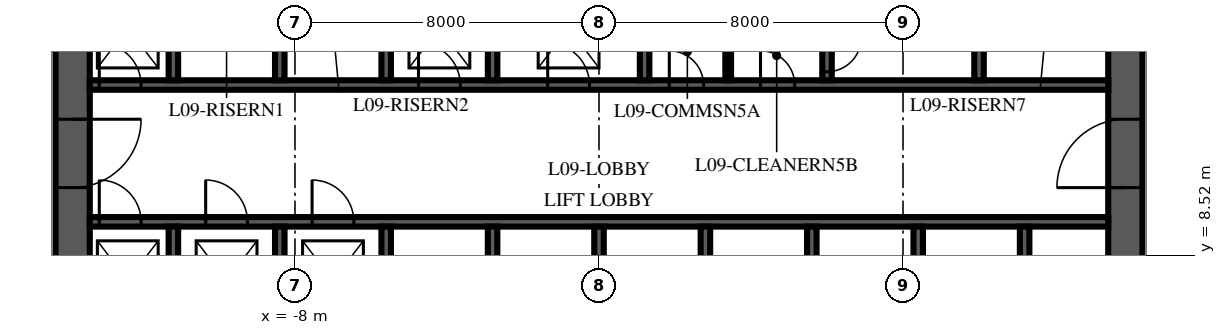
"""IFC4 building model, lengths in metres.
Left out: names, types, materials, properties, quantities, classifications, styles, units other than length and angle.
Written with IfcOpenShell. Run it as: python <this file> out.ifc"""

import sys

from ifc_helpers import new_model, si_unit, direction, frame, frame_2d, origin, place, context, subcontext, project, spatial, polyline, rectangle, outline, extrude, element, fill, save


model = new_model("IFC4")
c1 = context("Model", 3, precision=1e-05, world=origin(), true_north=direction((0.0, 1.0)))
c2 = subcontext(c1, "Body", "Model", "MODEL_VIEW")
j1 = project(units=[si_unit("LENGTHUNIT", "METRE"), si_unit("PLANEANGLEUNIT", "RADIAN")], contexts=[c1])
p1 = place(None, origin())
s1 = spatial("IfcSite", under=j1, at=p1, CompositionType="ELEMENT")
p2 = place(p1, origin())
s2 = spatial("IfcBuilding", under=s1, at=p2, CompositionType="ELEMENT")
p3 = place(p2, frame((0.0, 0.0, 48.0)))
s3 = spatial("IfcBuildingStorey", under=s2, at=p3, CompositionType="ELEMENT", Elevation=48.0)
p4 = place(p3, frame((13.85, 6.15, 0.0), z_axis=(0.0, 0.0, 1.0), x_axis=(0.0, 1.0, 0.0)))
e1 = element("IfcWall", 1, at=p4, inside=s3, PredefinedType="SHEAR", context=c2, shape_type="SweptSolid", body=[
    extrude(outline(polyline([(0.0, -0.45), (17.7, -0.45), (17.7, 0.0), (17.25, 0.0), (17.25, 0.45), (0.45, 0.45), (0.45, 0.0), (0.0, 0.0), (0.0, -0.45)])), origin(), (0.0, 0.0, 1.0), 4.0),
])
p5 = place(p4, frame((4.15, 0.0, 0.0)))
e2 = element("IfcOpeningElement", 2, at=p5, cuts=e1, PredefinedType="OPENING", context=c2, shape_type="SweptSolid", body=[
    extrude(rectangle(XDim=1.8, YDim=2.4, at=frame_2d((0.9, 1.2))), frame((0.0, 0.465, 0.0), z_axis=(0.0, -1.0, 0.0), x_axis=(1.0, 0.0, 0.0)), (0.0, 0.0, 1.0), 0.93),
])
p6 = place(p3, frame((-13.85, 23.85, 0.0), z_axis=(0.0, 0.0, 1.0), x_axis=(0.0, -1.0, 0.0)))
e3 = element("IfcWall", 3, at=p6, inside=s3, PredefinedType="SHEAR", context=c2, shape_type="SweptSolid", body=[
    extrude(outline(polyline([(0.0, -0.45), (17.7, -0.45), (17.7, 0.0), (17.25, 0.0), (17.25, 0.45), (0.45, 0.45), (0.45, 0.0), (0.0, 0.0), (0.0, -0.45)])), origin(), (0.0, 0.0, 1.0), 4.0),
])
p7 = place(p6, frame((11.75, 0.0, 0.0)))
e4 = element("IfcOpeningElement", 4, at=p7, cuts=e3, PredefinedType="OPENING", context=c2, shape_type="SweptSolid", body=[
    extrude(rectangle(XDim=1.8, YDim=2.4, at=frame_2d((0.9, 1.2))), frame((0.0, 0.465, 0.0), z_axis=(0.0, -1.0, 0.0), x_axis=(1.0, 0.0, 0.0)), (0.0, 0.0, 1.0), 0.93),
])
p8 = place(p3, frame((-13.4, 9.4, 0.0), z_axis=(0.0, 0.0, 1.0), x_axis=(1.0, 0.0, 0.0)))
e5 = element("IfcWall", 5, at=p8, inside=s3, PredefinedType="SHEAR", context=c2, shape_type="SweptSolid", body=[
    extrude(rectangle(XDim=26.8, YDim=0.25, at=frame_2d((13.4, 0.0))), origin(), (0.0, 0.0, 1.0), 4.0),
])
p9 = place(p8, frame((0.25, 0.0, 0.0)))
e6 = element("IfcOpeningElement", 6, at=p9, cuts=e5, PredefinedType="OPENING", context=c2, shape_type="SweptSolid", body=[
    extrude(rectangle(XDim=1.1, YDim=2.1, at=frame_2d((0.55, 1.05))), frame((0.0, 0.14, 0.0), z_axis=(0.0, -1.0, 0.0), x_axis=(1.0, 0.0, 0.0)), (0.0, 0.0, 1.0), 0.28),
])
p10 = place(p8, frame((3.05, 0.0, 0.0)))
e7 = element("IfcOpeningElement", 7, at=p10, cuts=e5, PredefinedType="OPENING", context=c2, shape_type="SweptSolid", body=[
    extrude(rectangle(XDim=1.1, YDim=2.1, at=frame_2d((0.55, 1.05))), frame((0.0, 0.14, 0.0), z_axis=(0.0, -1.0, 0.0), x_axis=(1.0, 0.0, 0.0)), (0.0, 0.0, 1.0), 0.28),
])
p11 = place(p8, frame((5.85, 0.0, 0.0)))
e8 = element("IfcOpeningElement", 8, at=p11, cuts=e5, PredefinedType="OPENING", context=c2, shape_type="SweptSolid", body=[
    extrude(rectangle(XDim=1.1, YDim=2.1, at=frame_2d((0.55, 1.05))), frame((0.0, 0.14, 0.0), z_axis=(0.0, -1.0, 0.0), x_axis=(1.0, 0.0, 0.0)), (0.0, 0.0, 1.0), 0.28),
])
p12 = place(p3, frame((-13.4, 13.0, 0.0), z_axis=(0.0, 0.0, 1.0), x_axis=(1.0, 0.0, 0.0)))
e9 = element("IfcWall", 9, at=p12, inside=s3, PredefinedType="SHEAR", context=c2, shape_type="SweptSolid", body=[
    extrude(rectangle(XDim=26.8, YDim=0.25, at=frame_2d((13.4, 0.0))), origin(), (0.0, 0.0, 1.0), 4.0),
])
p13 = place(p12, frame((0.25, 0.0, 0.0)))
e10 = element("IfcOpeningElement", 10, at=p13, cuts=e9, PredefinedType="OPENING", context=c2, shape_type="SweptSolid", body=[
    extrude(rectangle(XDim=1.1, YDim=2.1, at=frame_2d((0.55, 1.05))), frame((0.0, 0.14, 0.0), z_axis=(0.0, -1.0, 0.0), x_axis=(1.0, 0.0, 0.0)), (0.0, 0.0, 1.0), 0.28),
])
p14 = place(p12, frame((8.65, 0.0, 0.0)))
e11 = element("IfcOpeningElement", 11, at=p14, cuts=e9, PredefinedType="OPENING", context=c2, shape_type="SweptSolid", body=[
    extrude(rectangle(XDim=1.1, YDim=2.1, at=frame_2d((0.55, 1.05))), frame((0.0, 0.14, 0.0), z_axis=(0.0, -1.0, 0.0), x_axis=(1.0, 0.0, 0.0)), (0.0, 0.0, 1.0), 0.28),
])
p15 = place(p12, frame((12.05, 0.0, 0.0)))
e12 = element("IfcOpeningElement", 12, at=p15, cuts=e9, PredefinedType="OPENING", context=c2, shape_type="SweptSolid", body=[
    extrude(rectangle(XDim=1.1, YDim=2.1, at=frame_2d((0.55, 1.05))), frame((0.0, 0.14, 0.0), z_axis=(0.0, -1.0, 0.0), x_axis=(1.0, 0.0, 0.0)), (0.0, 0.0, 1.0), 0.28),
])
p16 = place(p12, frame((15.25, 0.0, 0.0)))
e13 = element("IfcOpeningElement", 13, at=p16, cuts=e9, PredefinedType="OPENING", context=c2, shape_type="SweptSolid", body=[
    extrude(rectangle(XDim=0.9, YDim=2.1, at=frame_2d((0.45, 1.05))), frame((0.0, 0.14, 0.0), z_axis=(0.0, -1.0, 0.0), x_axis=(1.0, 0.0, 0.0)), (0.0, 0.0, 1.0), 0.28),
])
p17 = place(p12, frame((17.65, 0.0, 0.0)))
e14 = element("IfcOpeningElement", 14, at=p17, cuts=e9, PredefinedType="OPENING", context=c2, shape_type="SweptSolid", body=[
    extrude(rectangle(XDim=0.9, YDim=2.1, at=frame_2d((0.45, 1.05))), frame((0.0, 0.14, 0.0), z_axis=(0.0, -1.0, 0.0), x_axis=(1.0, 0.0, 0.0)), (0.0, 0.0, 1.0), 0.28),
])
for number, where, z_axis, x_axis in (
    (15, (-11.2, 6.6, 0.0), (0.0, 0.0, 1.0), (0.0, 1.0, 0.0)),
    (16, (-8.4, 6.6, 0.0), (0.0, 0.0, 1.0), (0.0, 1.0, 0.0)),
    (17, (-5.6, 6.6, 0.0), (0.0, 0.0, 1.0), (0.0, 1.0, 0.0)),
    (18, (-2.8, 6.6, 0.0), (0.0, 0.0, 1.0), (0.0, 1.0, 0.0)),
    (19, (0.0, 6.6, 0.0), (0.0, 0.0, 1.0), (0.0, 1.0, 0.0)),
    (20, (2.8, 6.6, 0.0), (0.0, 0.0, 1.0), (0.0, 1.0, 0.0)),
    (21, (5.6, 6.6, 0.0), (0.0, 0.0, 1.0), (0.0, 1.0, 0.0)),
    (22, (8.4, 6.6, 0.0), (0.0, 0.0, 1.0), (0.0, 1.0, 0.0)),
    (23, (11.2, 6.6, 0.0), (0.0, 0.0, 1.0), (0.0, 1.0, 0.0)),
):
    element("IfcWall", number, at=place(p3, frame(where, z_axis=z_axis, x_axis=x_axis)), inside=s3, PredefinedType="SHEAR", context=c2, shape_type="SweptSolid", body=[
        extrude(rectangle(XDim=2.675, YDim=0.25, at=frame_2d((1.337, 0.0))), origin(), (0.0, 0.0, 1.0), 4.0),
    ])
for number, where, z_axis, x_axis in (
    (24, (-11.2, 13.125, 0.0), (0.0, 0.0, 1.0), (0.0, 1.0, 0.0)),
    (25, (-8.4, 13.125, 0.0), (0.0, 0.0, 1.0), (0.0, 1.0, 0.0)),
    (26, (-5.6, 13.125, 0.0), (0.0, 0.0, 1.0), (0.0, 1.0, 0.0)),
    (27, (-2.8, 13.125, 0.0), (0.0, 0.0, 1.0), (0.0, 1.0, 0.0)),
    (28, (1.2, 13.125, 0.0), (0.0, 0.0, 1.0), (0.0, 1.0, 0.0)),
):
    element("IfcWall", number, at=place(p3, frame(where, z_axis=z_axis, x_axis=x_axis)), inside=s3, PredefinedType="SHEAR", context=c2, shape_type="SweptSolid", body=[
        extrude(rectangle(XDim=2.75, YDim=0.25, at=frame_2d((1.375, 0.0))), origin(), (0.0, 0.0, 1.0), 4.0),
    ])
p18 = place(p3, frame((6.0, 13.125, 0.0), z_axis=(0.0, 0.0, 1.0), x_axis=(0.0, 1.0, 0.0)))
e29 = element("IfcWall", 29, at=p18, inside=s3, PredefinedType="SHEAR", context=c2, shape_type="SweptSolid", body=[
    extrude(rectangle(XDim=2.75, YDim=0.25, at=frame_2d((1.375, 0.0))), origin(), (0.0, 0.0, 1.0), 4.0),
])
p19 = place(p18, frame((0.225, 0.0, 0.0)))
e30 = element("IfcOpeningElement", 30, at=p19, cuts=e29, PredefinedType="OPENING", context=c2, shape_type="SweptSolid", body=[
    extrude(rectangle(XDim=0.9, YDim=2.1, at=frame_2d((0.45, 1.05))), frame((0.0, 0.14, 0.0), z_axis=(0.0, -1.0, 0.0), x_axis=(1.0, 0.0, 0.0)), (0.0, 0.0, 1.0), 0.28),
])
p20 = place(p3, frame((10.0, 13.125, 0.0), z_axis=(0.0, 0.0, 1.0), x_axis=(0.0, 1.0, 0.0)))
e31 = element("IfcWall", 31, at=p20, inside=s3, PredefinedType="SHEAR", context=c2, shape_type="SweptSolid", body=[
    extrude(rectangle(XDim=2.75, YDim=0.25, at=frame_2d((1.375, 0.0))), origin(), (0.0, 0.0, 1.0), 4.0),
])
p21 = place(p3, frame((3.4, 13.125, 0.0), z_axis=(0.0, 0.0, 1.0), x_axis=(0.0, 1.0, 0.0)))
e32 = element("IfcWall", 32, at=p21, inside=s3, PredefinedType="PARTITIONING", context=c2, shape_type="SweptSolid", body=[
    extrude(rectangle(XDim=1.45, YDim=0.15, at=frame_2d((0.725, 0.0))), origin(), (0.0, 0.0, 1.0), 3.85),
])
p22 = place(p5, origin())
e33 = element("IfcDoor", 33, at=p22, inside=s3, OperationType="DOUBLE_DOOR_SINGLE_SWING", PredefinedType="DOOR", context=c2, shape_type="SweptSolid", body=[
    extrude(rectangle(XDim=1.8, YDim=2.4, at=frame_2d((0.9, 1.2))), frame((0.0, 0.45, 0.0), z_axis=(0.0, -1.0, 0.0), x_axis=(1.0, 0.0, 0.0)), (0.0, 0.0, 1.0), 0.899),
])
fill(e2, e33)
p23 = place(p7, origin())
e34 = element("IfcDoor", 34, at=p23, inside=s3, OperationType="DOUBLE_DOOR_SINGLE_SWING", PredefinedType="DOOR", context=c2, shape_type="SweptSolid", body=[
    extrude(rectangle(XDim=1.8, YDim=2.4, at=frame_2d((0.9, 1.2))), frame((0.0, 0.45, 0.0), z_axis=(0.0, -1.0, 0.0), x_axis=(1.0, 0.0, 0.0)), (0.0, 0.0, 1.0), 0.899),
])
fill(e4, e34)
p24 = place(p9, origin())
e35 = element("IfcDoor", 35, at=p24, inside=s3, OperationType="SLIDING_TO_LEFT", PredefinedType="DOOR", context=c2, shape_type="SweptSolid", body=[
    extrude(rectangle(XDim=1.1, YDim=2.1, at=frame_2d((0.55, 1.05))), frame((0.0, 0.125, 0.0), z_axis=(0.0, -1.0, 0.0), x_axis=(1.0, 0.0, 0.0)), (0.0, 0.0, 1.0), 0.25),
])
fill(e6, e35)
p25 = place(p10, origin())
e36 = element("IfcDoor", 36, at=p25, inside=s3, OperationType="SLIDING_TO_LEFT", PredefinedType="DOOR", context=c2, shape_type="SweptSolid", body=[
    extrude(rectangle(XDim=1.1, YDim=2.1, at=frame_2d((0.55, 1.05))), frame((0.0, 0.125, 0.0), z_axis=(0.0, -1.0, 0.0), x_axis=(1.0, 0.0, 0.0)), (0.0, 0.0, 1.0), 0.25),
])
fill(e7, e36)
p26 = place(p11, origin())
e37 = element("IfcDoor", 37, at=p26, inside=s3, OperationType="SLIDING_TO_LEFT", PredefinedType="DOOR", context=c2, shape_type="SweptSolid", body=[
    extrude(rectangle(XDim=1.1, YDim=2.1, at=frame_2d((0.55, 1.05))), frame((0.0, 0.125, 0.0), z_axis=(0.0, -1.0, 0.0), x_axis=(1.0, 0.0, 0.0)), (0.0, 0.0, 1.0), 0.25),
])
fill(e8, e37)
p27 = place(p13, origin())
e38 = element("IfcDoor", 38, at=p27, inside=s3, OperationType="SLIDING_TO_LEFT", PredefinedType="DOOR", context=c2, shape_type="SweptSolid", body=[
    extrude(rectangle(XDim=1.1, YDim=2.1, at=frame_2d((0.55, 1.05))), frame((0.0, 0.125, 0.0), z_axis=(0.0, -1.0, 0.0), x_axis=(1.0, 0.0, 0.0)), (0.0, 0.0, 1.0), 0.25),
])
fill(e10, e38)
p28 = place(p14, origin())
e39 = element("IfcDoor", 39, at=p28, inside=s3, OperationType="SLIDING_TO_LEFT", PredefinedType="DOOR", context=c2, shape_type="SweptSolid", body=[
    extrude(rectangle(XDim=1.1, YDim=2.1, at=frame_2d((0.55, 1.05))), frame((0.0, 0.125, 0.0), z_axis=(0.0, -1.0, 0.0), x_axis=(1.0, 0.0, 0.0)), (0.0, 0.0, 1.0), 0.25),
])
fill(e11, e39)
p29 = place(p15, origin())
e40 = element("IfcDoor", 40, at=p29, inside=s3, OperationType="SLIDING_TO_LEFT", PredefinedType="DOOR", context=c2, shape_type="SweptSolid", body=[
    extrude(rectangle(XDim=1.1, YDim=2.1, at=frame_2d((0.55, 1.05))), frame((0.0, 0.125, 0.0), z_axis=(0.0, -1.0, 0.0), x_axis=(1.0, 0.0, 0.0)), (0.0, 0.0, 1.0), 0.25),
])
fill(e12, e40)
p30 = place(p16, origin())
e41 = element("IfcDoor", 41, at=p30, inside=s3, OperationType="SINGLE_SWING_LEFT", PredefinedType="DOOR", context=c2, shape_type="SweptSolid", body=[
    extrude(rectangle(XDim=0.9, YDim=2.1, at=frame_2d((0.45, 1.05))), frame((0.0, 0.125, 0.0), z_axis=(0.0, -1.0, 0.0), x_axis=(1.0, 0.0, 0.0)), (0.0, 0.0, 1.0), 0.25),
])
fill(e13, e41)
p31 = place(p17, origin())
e42 = element("IfcDoor", 42, at=p31, inside=s3, OperationType="SINGLE_SWING_LEFT", PredefinedType="DOOR", context=c2, shape_type="SweptSolid", body=[
    extrude(rectangle(XDim=0.9, YDim=2.1, at=frame_2d((0.45, 1.05))), frame((0.0, 0.125, 0.0), z_axis=(0.0, -1.0, 0.0), x_axis=(1.0, 0.0, 0.0)), (0.0, 0.0, 1.0), 0.25),
])
fill(e14, e42)
p32 = place(p19, frame((0.9, 0.0, 0.0), z_axis=(0.0, 0.0, 1.0), x_axis=(-1.0, 0.0, 0.0)))
e43 = element("IfcDoor", 43, at=p32, inside=s3, OperationType="SINGLE_SWING_LEFT", PredefinedType="DOOR", context=c2, shape_type="SweptSolid", body=[
    extrude(rectangle(XDim=0.9, YDim=2.1, at=frame_2d((0.45, 1.05))), frame((0.0, 0.125, 0.0), z_axis=(0.0, -1.0, 0.0), x_axis=(1.0, 0.0, 0.0)), (0.0, 0.0, 1.0), 0.25),
])
fill(e30, e43)
save(model, sys.argv[1])
